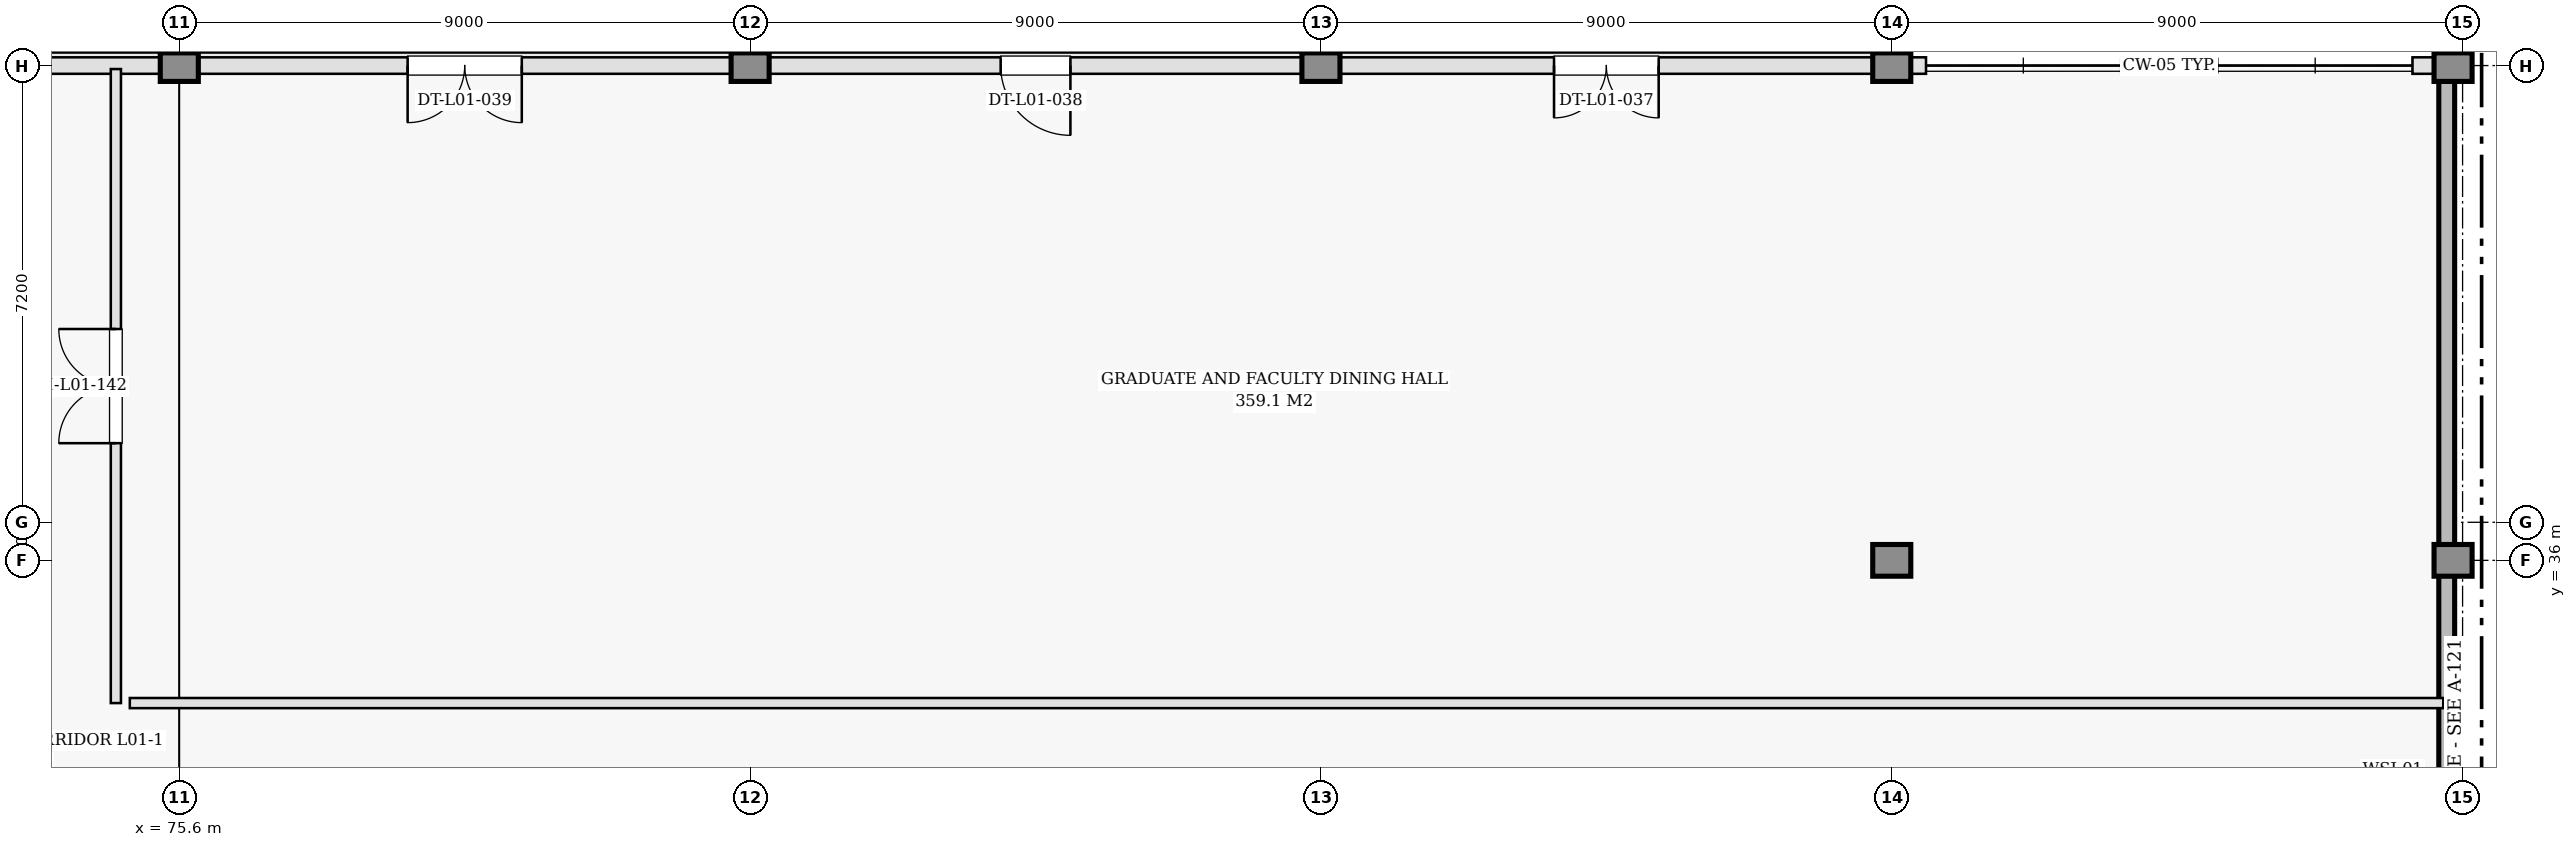
"""IFC4 building model, lengths in metres.
Left out: names, types, materials, properties, quantities, classifications, styles, units other than length and angle.
Written with IfcOpenShell. Run it as: python <this file> out.ifc"""

import sys

from ifc_helpers import new_model, si_unit, direction, frame, frame_2d, origin, origin_2d, place, context, subcontext, project, spatial, rectangle, extrude, element, fill, save


model = new_model("IFC4")
c1 = context("Model", 3, precision=1e-05, world=origin(), true_north=direction((0.0, 1.0)))
c2 = subcontext(c1, "Body", "Model", "MODEL_VIEW")
j1 = project(units=[si_unit("LENGTHUNIT", "METRE"), si_unit("PLANEANGLEUNIT", "RADIAN")], contexts=[c1])
p1 = place(None, origin())
s1 = spatial("IfcSite", under=j1, at=p1, CompositionType="ELEMENT")
p2 = place(p1, origin())
s2 = spatial("IfcBuilding", under=s1, at=p2, CompositionType="ELEMENT")
p3 = place(p2, frame((0.0, 0.0, 4.8)))
s3 = spatial("IfcBuildingStorey", under=s2, at=p3, CompositionType="ELEMENT", Elevation=4.8)
for number, where, z_axis, x_axis in (
    (1, (75.6, 43.8, 0.0), (0.0, 0.0, 1.0), (1.0, 0.0, 0.0)),
    (2, (84.6, 43.8, 0.0), (0.0, 0.0, 1.0), (1.0, 0.0, 0.0)),
    (3, (93.6, 43.8, 0.0), (0.0, 0.0, 1.0), (1.0, 0.0, 0.0)),
    (4, (102.6, 36.0, 0.0), (0.0, 0.0, 1.0), (1.0, 0.0, 0.0)),
    (5, (102.6, 43.8, 0.0), (0.0, 0.0, 1.0), (1.0, 0.0, 0.0)),
    (6, (111.45, 36.0, 0.0), (0.0, 0.0, 1.0), (1.0, 0.0, 0.0)),
    (7, (111.45, 43.8, 0.0), (0.0, 0.0, 1.0), (1.0, 0.0, 0.0)),
):
    element("IfcColumn", number, at=place(p3, frame(where, z_axis=z_axis, x_axis=x_axis)), inside=s3, PredefinedType="COLUMN", context=c2, shape_type="SweptSolid", body=[
        extrude(rectangle(XDim=0.5, YDim=0.5, at=origin_2d()), origin(), (0.0, 0.0, 1.0), 4.8),
    ])
p4 = place(p3, frame((111.35, 21.6, 0.0), z_axis=(0.0, 0.0, 1.0), x_axis=(0.0, 1.0, 0.0)))
e8 = element("IfcWall", 8, at=p4, inside=s3, PredefinedType="SHEAR", context=c2, shape_type="SweptSolid", body=[
    extrude(rectangle(XDim=22.2, YDim=0.25, at=frame_2d((11.1, 0.0))), origin(), (0.0, 0.0, 1.0), 4.8),
])
p5 = place(p3, frame((111.223, 43.8, 0.0), z_axis=(0.0, 0.0, 1.0), x_axis=(-1.0, 0.0, 0.0)))
e9 = element("IfcWall", 9, at=p5, inside=s3, PredefinedType="SOLIDWALL", context=c2, shape_type="SweptSolid", body=[
    extrude(rectangle(XDim=0.413, YDim=0.26, at=frame_2d((0.207, 0.0))), origin(), (0.0, 0.0, 1.0), 4.8),
])
p6 = place(p3, frame((103.14, 43.8, 0.0), z_axis=(0.0, 0.0, 1.0), x_axis=(-1.0, 0.0, 0.0)))
e10 = element("IfcWall", 10, at=p6, inside=s3, PredefinedType="SOLIDWALL", context=c2, shape_type="SweptSolid", body=[
    extrude(rectangle(XDim=0.54, YDim=0.26, at=frame_2d((0.27, 0.0))), origin(), (0.0, 0.0, 1.0), 4.8),
])
p7 = place(p3, frame((102.6, 43.8, 0.0), z_axis=(0.0, 0.0, 1.0), x_axis=(-1.0, 0.0, 0.0)))
e11 = element("IfcWall", 11, at=p7, inside=s3, PredefinedType="SOLIDWALL", context=c2, shape_type="SweptSolid", body=[
    extrude(rectangle(XDim=9.0, YDim=0.26, at=frame_2d((4.5, 0.0))), origin(), (0.0, 0.0, 1.0), 4.8),
])
p8 = place(p7, frame((3.675, 0.0, 0.0)))
e12 = element("IfcOpeningElement", 12, at=p8, cuts=e11, PredefinedType="OPENING", context=c2, shape_type="SweptSolid", body=[
    extrude(rectangle(XDim=1.65, YDim=2.2, at=frame_2d((0.825, 1.1))), frame((0.0, 0.14, 0.0), z_axis=(0.0, -1.0, 0.0), x_axis=(1.0, 0.0, 0.0)), (0.0, 0.0, 1.0), 0.28),
])
p9 = place(p3, frame((93.6, 43.8, 0.0), z_axis=(0.0, 0.0, 1.0), x_axis=(-1.0, 0.0, 0.0)))
e13 = element("IfcWall", 13, at=p9, inside=s3, PredefinedType="SOLIDWALL", context=c2, shape_type="SweptSolid", body=[
    extrude(rectangle(XDim=9.0, YDim=0.26, at=frame_2d((4.5, 0.0))), origin(), (0.0, 0.0, 1.0), 4.8),
])
p10 = place(p9, frame((3.95, 0.0, 0.0)))
e14 = element("IfcOpeningElement", 14, at=p10, cuts=e13, PredefinedType="OPENING", context=c2, shape_type="SweptSolid", body=[
    extrude(rectangle(XDim=1.1, YDim=2.2, at=frame_2d((0.55, 1.1))), frame((0.0, 0.14, 0.0), z_axis=(0.0, -1.0, 0.0), x_axis=(1.0, 0.0, 0.0)), (0.0, 0.0, 1.0), 0.28),
])
p11 = place(p3, frame((84.6, 43.8, 0.0), z_axis=(0.0, 0.0, 1.0), x_axis=(-1.0, 0.0, 0.0)))
e15 = element("IfcWall", 15, at=p11, inside=s3, PredefinedType="SOLIDWALL", context=c2, shape_type="SweptSolid", body=[
    extrude(rectangle(XDim=9.0, YDim=0.26, at=frame_2d((4.5, 0.0))), origin(), (0.0, 0.0, 1.0), 4.8),
])
p12 = place(p11, frame((3.6, 0.0, 0.0)))
e16 = element("IfcOpeningElement", 16, at=p12, cuts=e15, PredefinedType="OPENING", context=c2, shape_type="SweptSolid", body=[
    extrude(rectangle(XDim=1.8, YDim=2.25, at=frame_2d((0.9, 1.125))), frame((0.0, 0.14, 0.0), z_axis=(0.0, -1.0, 0.0), x_axis=(1.0, 0.0, 0.0)), (0.0, 0.0, 1.0), 0.28),
])
p13 = place(p3, frame((75.6, 43.8, 0.0), z_axis=(0.0, 0.0, 1.0), x_axis=(-1.0, 0.0, 0.0)))
e17 = element("IfcWall", 17, at=p13, inside=s3, PredefinedType="SOLIDWALL", context=c2, shape_type="SweptSolid", body=[
    extrude(rectangle(XDim=9.0, YDim=0.26, at=frame_2d((4.5, 0.0))), origin(), (0.0, 0.0, 1.0), 4.8),
])
p14 = place(p13, frame((2.325, 0.0, 0.0)))
e18 = element("IfcOpeningElement", 18, at=p14, cuts=e17, PredefinedType="OPENING", context=c2, shape_type="SweptSolid", body=[
    extrude(rectangle(XDim=1.65, YDim=2.2, at=frame_2d((0.825, 1.1))), frame((0.0, 0.14, 0.0), z_axis=(0.0, -1.0, 0.0), x_axis=(1.0, 0.0, 0.0)), (0.0, 0.0, 1.0), 0.28),
])
p15 = place(p3, frame((74.6, 33.75, 0.0), z_axis=(0.0, 0.0, 1.0), x_axis=(0.0, 1.0, 0.0)))
e19 = element("IfcWall", 19, at=p15, inside=s3, PredefinedType="PARTITIONING", context=c2, shape_type="SweptSolid", body=[
    extrude(rectangle(XDim=9.995, YDim=0.16, at=frame_2d((4.998, 0.0))), origin(), (0.0, 0.0, 1.0), 4.48),
])
p16 = place(p15, frame((4.097, 0.0, 0.0)))
e20 = element("IfcOpeningElement", 20, at=p16, cuts=e19, PredefinedType="OPENING", context=c2, shape_type="SweptSolid", body=[
    extrude(rectangle(XDim=1.8, YDim=2.2, at=frame_2d((0.9, 1.1))), frame((0.0, 0.09, 0.0), z_axis=(0.0, -1.0, 0.0), x_axis=(1.0, 0.0, 0.0)), (0.0, 0.0, 1.0), 0.18),
])
p17 = place(p3, frame((74.82, 33.75, 0.0), z_axis=(0.0, 0.0, 1.0), x_axis=(1.0, 0.0, 0.0)))
e21 = element("IfcWall", 21, at=p17, inside=s3, PredefinedType="PARTITIONING", context=c2, shape_type="SweptSolid", body=[
    extrude(rectangle(XDim=36.475, YDim=0.16, at=frame_2d((18.237, 0.0))), origin(), (0.0, 0.0, 1.0), 4.48),
])
p18 = place(p8, origin())
e22 = element("IfcDoor", 22, at=p18, inside=s3, OperationType="DOUBLE_DOOR_SINGLE_SWING", PredefinedType="DOOR", context=c2, shape_type="SweptSolid", body=[
    extrude(rectangle(XDim=1.65, YDim=2.2, at=frame_2d((0.825, 1.1))), frame((0.0, 0.025, 0.0), z_axis=(0.0, -1.0, 0.0), x_axis=(1.0, 0.0, 0.0)), (0.0, 0.0, 1.0), 0.05),
])
fill(e12, e22)
p19 = place(p10, origin())
e23 = element("IfcDoor", 23, at=p19, inside=s3, OperationType="SINGLE_SWING_LEFT", PredefinedType="DOOR", context=c2, shape_type="SweptSolid", body=[
    extrude(rectangle(XDim=1.1, YDim=2.2, at=frame_2d((0.55, 1.1))), frame((0.0, 0.025, 0.0), z_axis=(0.0, -1.0, 0.0), x_axis=(1.0, 0.0, 0.0)), (0.0, 0.0, 1.0), 0.05),
])
fill(e14, e23)
p20 = place(p12, origin())
e24 = element("IfcDoor", 24, at=p20, inside=s3, OperationType="DOUBLE_DOOR_SINGLE_SWING", PredefinedType="DOOR", context=c2, shape_type="SweptSolid", body=[
    extrude(rectangle(XDim=1.8, YDim=2.25, at=frame_2d((0.9, 1.125))), frame((0.0, 0.025, 0.0), z_axis=(0.0, -1.0, 0.0), x_axis=(1.0, 0.0, 0.0)), (0.0, 0.0, 1.0), 0.05),
])
fill(e16, e24)
p21 = place(p16, origin())
e25 = element("IfcDoor", 25, at=p21, inside=s3, OperationType="DOUBLE_DOOR_SINGLE_SWING", PredefinedType="DOOR", context=c2, shape_type="SweptSolid", body=[
    extrude(rectangle(XDim=1.8, YDim=2.2, at=frame_2d((0.9, 1.1))), frame((0.0, 0.025, 0.0), z_axis=(0.0, -1.0, 0.0), x_axis=(1.0, 0.0, 0.0)), (0.0, 0.0, 1.0), 0.05),
])
fill(e20, e25)
save(model, sys.argv[1])
